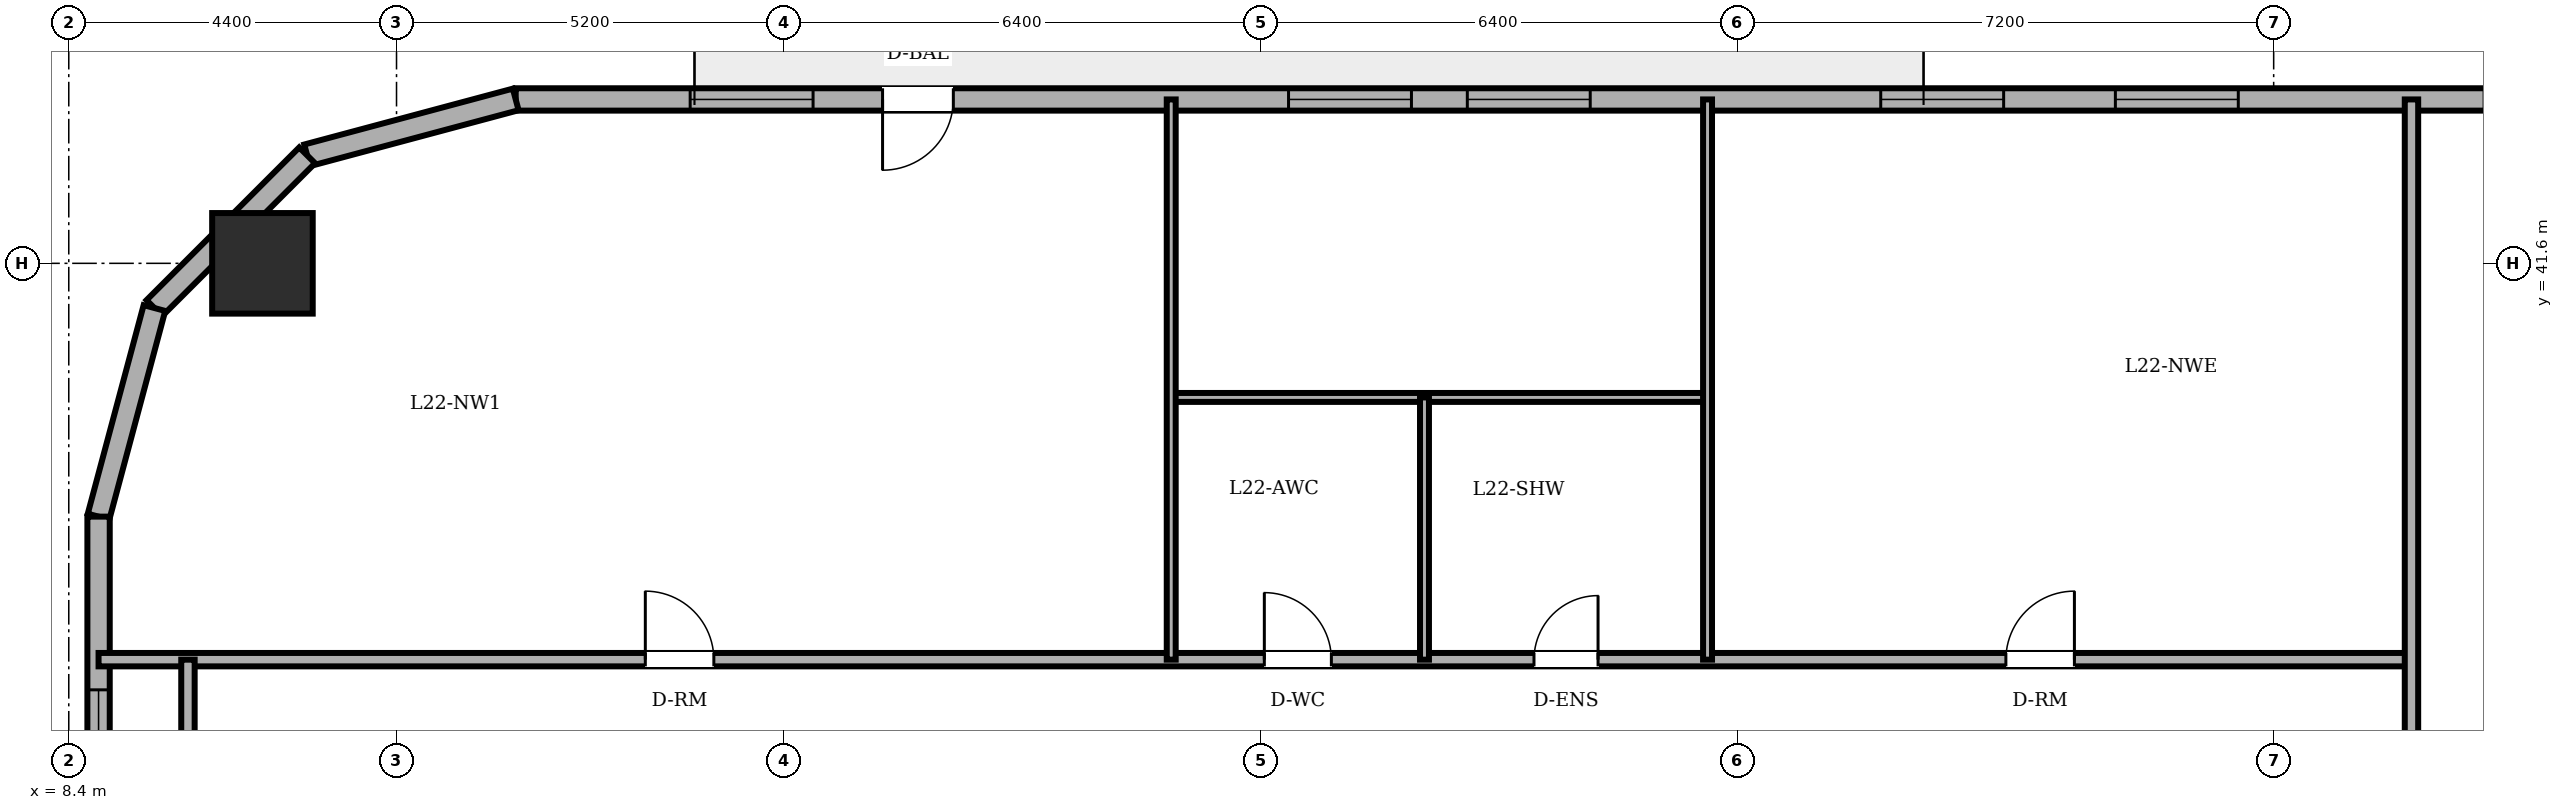
"""IFC4 building model, lengths in metres.
Left out: names, types, materials, properties, quantities, classifications, styles, units other than length and angle.
Written with IfcOpenShell. Run it as: python <this file> out.ifc"""

import sys

from ifc_helpers import new_model, si_unit, direction, frame, frame_2d, origin, origin_2d, place, context, subcontext, project, spatial, rectangle, circle, extrude, element, fill, save


model = new_model("IFC4")
c1 = context("Model", 3, precision=1e-05, world=origin(), true_north=direction((0.0, 1.0)))
c2 = subcontext(c1, "Body", "Model", "MODEL_VIEW")
j1 = project(units=[si_unit("LENGTHUNIT", "METRE"), si_unit("PLANEANGLEUNIT", "RADIAN")], contexts=[c1])
p1 = place(None, origin())
s1 = spatial("IfcSite", under=j1, at=p1, CompositionType="ELEMENT")
p2 = place(p1, origin())
s2 = spatial("IfcBuilding", under=s1, at=p2, CompositionType="ELEMENT")
p3 = place(p2, frame((0.0, 0.0, 86.3)))
s3 = spatial("IfcBuildingStorey", under=s2, at=p3, CompositionType="ELEMENT", Elevation=86.3)
p4 = place(p3, frame((11.0, 41.6, 0.0), z_axis=(0.0, 0.0, 1.0), x_axis=(1.0, 0.0, 0.0)))
e1 = element("IfcColumn", 1, at=p4, inside=s3, PredefinedType="COLUMN", context=c2, shape_type="SweptSolid", body=[
    extrude(circle(Radius=0.675, at=origin_2d()), origin(), (0.0, 0.0, 1.0), 3.6),
])
p5 = place(p3, frame((44.333, 43.8, 0.0), z_axis=(0.0, 0.0, 1.0), x_axis=(-1.0, 0.0, 0.0)))
e2 = element("IfcWall", 2, at=p5, inside=s3, PredefinedType="SOLIDWALL", context=c2, shape_type="SweptSolid", body=[
    extrude(rectangle(XDim=29.933, YDim=0.3, at=frame_2d((14.967, 0.0))), origin(), (0.0, 0.0, 1.0), 3.4),
])
p6 = place(p5, frame((24.058, 0.0, 0.0)))
e3 = element("IfcOpeningElement", 3, at=p6, cuts=e2, PredefinedType="OPENING", context=c2, shape_type="SweptSolid", body=[
    extrude(rectangle(XDim=0.95, YDim=2.2, at=frame_2d((0.475, 1.1))), frame((0.0, 0.16, 0.0), z_axis=(0.0, -1.0, 0.0), x_axis=(1.0, 0.0, 0.0)), (0.0, 0.0, 1.0), 0.32),
])
p7 = place(p5, frame((1.858, 0.0, 0.85)))
e4 = element("IfcOpeningElement", 4, at=p7, cuts=e2, PredefinedType="OPENING", context=c2, shape_type="SweptSolid", body=[
    extrude(rectangle(XDim=1.65, YDim=1.55, at=frame_2d((0.825, 0.775))), frame((0.0, 0.16, 0.0), z_axis=(0.0, -1.0, 0.0), x_axis=(1.0, 0.0, 0.0)), (0.0, 0.0, 1.0), 0.32),
])
p8 = place(p5, frame((6.808, 0.0, 0.85)))
e5 = element("IfcOpeningElement", 5, at=p8, cuts=e2, PredefinedType="OPENING", context=c2, shape_type="SweptSolid", body=[
    extrude(rectangle(XDim=1.65, YDim=1.55, at=frame_2d((0.825, 0.775))), frame((0.0, 0.16, 0.0), z_axis=(0.0, -1.0, 0.0), x_axis=(1.0, 0.0, 0.0)), (0.0, 0.0, 1.0), 0.32),
])
p9 = place(p5, frame((9.958, 0.0, 0.85)))
e6 = element("IfcOpeningElement", 6, at=p9, cuts=e2, PredefinedType="OPENING", context=c2, shape_type="SweptSolid", body=[
    extrude(rectangle(XDim=1.65, YDim=1.55, at=frame_2d((0.825, 0.775))), frame((0.0, 0.16, 0.0), z_axis=(0.0, -1.0, 0.0), x_axis=(1.0, 0.0, 0.0)), (0.0, 0.0, 1.0), 0.32),
])
p10 = place(p5, frame((15.508, 0.0, 0.85)))
e7 = element("IfcOpeningElement", 7, at=p10, cuts=e2, PredefinedType="OPENING", context=c2, shape_type="SweptSolid", body=[
    extrude(rectangle(XDim=1.65, YDim=1.55, at=frame_2d((0.825, 0.775))), frame((0.0, 0.16, 0.0), z_axis=(0.0, -1.0, 0.0), x_axis=(1.0, 0.0, 0.0)), (0.0, 0.0, 1.0), 0.32),
])
p11 = place(p5, frame((17.908, 0.0, 0.85)))
e8 = element("IfcOpeningElement", 8, at=p11, cuts=e2, PredefinedType="OPENING", context=c2, shape_type="SweptSolid", body=[
    extrude(rectangle(XDim=1.65, YDim=1.55, at=frame_2d((0.825, 0.775))), frame((0.0, 0.16, 0.0), z_axis=(0.0, -1.0, 0.0), x_axis=(1.0, 0.0, 0.0)), (0.0, 0.0, 1.0), 0.32),
])
p12 = place(p5, frame((25.941, 0.0, 0.85)))
e9 = element("IfcOpeningElement", 9, at=p12, cuts=e2, PredefinedType="OPENING", context=c2, shape_type="SweptSolid", body=[
    extrude(rectangle(XDim=1.65, YDim=1.55, at=frame_2d((0.825, 0.775))), frame((0.0, 0.16, 0.0), z_axis=(0.0, -1.0, 0.0), x_axis=(1.0, 0.0, 0.0)), (0.0, 0.0, 1.0), 0.32),
])
p13 = place(p3, frame((14.4, 43.8, 0.0), z_axis=(0.0, 0.0, 1.0), x_axis=(-0.965943540406, -0.258752926066, 0.0)))
e10 = element("IfcWall", 10, at=p13, inside=s3, PredefinedType="SOLIDWALL", context=c2, shape_type="SweptSolid", body=[
    extrude(rectangle(XDim=2.898, YDim=0.3, at=frame_2d((1.449, 0.0))), origin(), (0.0, 0.0, 1.0), 3.4),
])
p14 = place(p3, frame((11.6, 43.05, 0.0), z_axis=(0.0, 0.0, 1.0), x_axis=(-0.707106781187, -0.707106781187, 0.0)))
e11 = element("IfcWall", 11, at=p14, inside=s3, PredefinedType="SOLIDWALL", context=c2, shape_type="SweptSolid", body=[
    extrude(rectangle(XDim=2.899, YDim=0.3, at=frame_2d((1.45, 0.0))), origin(), (0.0, 0.0, 1.0), 3.4),
])
p15 = place(p3, frame((9.55, 41.0, 0.0), z_axis=(0.0, 0.0, 1.0), x_axis=(-0.258731875344, -0.96594917914, 0.0)))
e12 = element("IfcWall", 12, at=p15, inside=s3, PredefinedType="SOLIDWALL", context=c2, shape_type="SweptSolid", body=[
    extrude(rectangle(XDim=2.899, YDim=0.3, at=frame_2d((1.449, 0.0))), origin(), (0.0, 0.0, 1.0), 3.4),
])
p16 = place(p3, frame((8.8, 38.2, 0.0), z_axis=(0.0, 0.0, 1.0), x_axis=(0.0, -1.0, 0.0)))
e13 = element("IfcWall", 13, at=p16, inside=s3, PredefinedType="SOLIDWALL", context=c2, shape_type="SweptSolid", body=[
    extrude(rectangle(XDim=28.4, YDim=0.3, at=frame_2d((14.2, 0.0))), origin(), (0.0, 0.0, 1.0), 3.4),
])
p17 = place(p16, frame((2.325, 0.0, 0.85)))
e14 = element("IfcOpeningElement", 14, at=p17, cuts=e13, PredefinedType="OPENING", context=c2, shape_type="SweptSolid", body=[
    extrude(rectangle(XDim=1.65, YDim=1.55, at=frame_2d((0.825, 0.775))), frame((0.0, 0.16, 0.0), z_axis=(0.0, -1.0, 0.0), x_axis=(1.0, 0.0, 0.0)), (0.0, 0.0, 1.0), 0.32),
])
p18 = place(p16, frame((7.328, 0.0, 0.85)))
e15 = element("IfcOpeningElement", 15, at=p18, cuts=e13, PredefinedType="OPENING", context=c2, shape_type="SweptSolid", body=[
    extrude(rectangle(XDim=1.65, YDim=1.55, at=frame_2d((0.825, 0.775))), frame((0.0, 0.16, 0.0), z_axis=(0.0, -1.0, 0.0), x_axis=(1.0, 0.0, 0.0)), (0.0, 0.0, 1.0), 0.32),
])
p19 = place(p16, frame((11.102, 0.0, 0.85)))
e16 = element("IfcOpeningElement", 16, at=p19, cuts=e13, PredefinedType="OPENING", context=c2, shape_type="SweptSolid", body=[
    extrude(rectangle(XDim=1.65, YDim=1.55, at=frame_2d((0.825, 0.775))), frame((0.0, 0.16, 0.0), z_axis=(0.0, -1.0, 0.0), x_axis=(1.0, 0.0, 0.0)), (0.0, 0.0, 1.0), 0.32),
])
p20 = place(p16, frame((17.648, 0.0, 0.85)))
e17 = element("IfcOpeningElement", 17, at=p20, cuts=e13, PredefinedType="OPENING", context=c2, shape_type="SweptSolid", body=[
    extrude(rectangle(XDim=1.65, YDim=1.55, at=frame_2d((0.825, 0.775))), frame((0.0, 0.16, 0.0), z_axis=(0.0, -1.0, 0.0), x_axis=(1.0, 0.0, 0.0)), (0.0, 0.0, 1.0), 0.32),
])
p21 = place(p16, frame((20.422, 0.0, 0.85)))
e18 = element("IfcOpeningElement", 18, at=p21, cuts=e13, PredefinedType="OPENING", context=c2, shape_type="SweptSolid", body=[
    extrude(rectangle(XDim=1.65, YDim=1.55, at=frame_2d((0.825, 0.775))), frame((0.0, 0.16, 0.0), z_axis=(0.0, -1.0, 0.0), x_axis=(1.0, 0.0, 0.0)), (0.0, 0.0, 1.0), 0.32),
])
p22 = place(p16, frame((24.425, 0.0, 0.85)))
e19 = element("IfcOpeningElement", 19, at=p22, cuts=e13, PredefinedType="OPENING", context=c2, shape_type="SweptSolid", body=[
    extrude(rectangle(XDim=1.65, YDim=1.55, at=frame_2d((0.825, 0.775))), frame((0.0, 0.16, 0.0), z_axis=(0.0, -1.0, 0.0), x_axis=(1.0, 0.0, 0.0)), (0.0, 0.0, 1.0), 0.32),
])
p23 = place(p3, frame((8.8, 36.28, 0.0), z_axis=(0.0, 0.0, 1.0), x_axis=(1.0, 0.0, 0.0)))
e20 = element("IfcWall", 20, at=p23, inside=s3, PredefinedType="PARTITIONING", context=c2, shape_type="SweptSolid", body=[
    extrude(rectangle(XDim=31.05, YDim=0.18, at=frame_2d((15.525, 0.0))), origin(), (0.0, 0.0, 1.0), 3.4),
])
p24 = place(p23, frame((15.65, 0.0, 0.0)))
e21 = element("IfcOpeningElement", 21, at=p24, cuts=e20, PredefinedType="OPENING", context=c2, shape_type="SweptSolid", body=[
    extrude(rectangle(XDim=0.9, YDim=2.1, at=frame_2d((0.45, 1.05))), frame((0.0, 0.1, 0.0), z_axis=(0.0, -1.0, 0.0), x_axis=(1.0, 0.0, 0.0)), (0.0, 0.0, 1.0), 0.2),
])
p25 = place(p23, frame((19.27, 0.0, 0.0)))
e22 = element("IfcOpeningElement", 22, at=p25, cuts=e20, PredefinedType="OPENING", context=c2, shape_type="SweptSolid", body=[
    extrude(rectangle(XDim=0.86, YDim=2.1, at=frame_2d((0.43, 1.05))), frame((0.0, 0.1, 0.0), z_axis=(0.0, -1.0, 0.0), x_axis=(1.0, 0.0, 0.0)), (0.0, 0.0, 1.0), 0.2),
])
p26 = place(p23, frame((7.34, 0.0, 0.0)))
e23 = element("IfcOpeningElement", 23, at=p26, cuts=e20, PredefinedType="OPENING", context=c2, shape_type="SweptSolid", body=[
    extrude(rectangle(XDim=0.92, YDim=2.1, at=frame_2d((0.46, 1.05))), frame((0.0, 0.1, 0.0), z_axis=(0.0, -1.0, 0.0), x_axis=(1.0, 0.0, 0.0)), (0.0, 0.0, 1.0), 0.2),
])
p27 = place(p23, frame((25.605, 0.0, 0.0)))
e24 = element("IfcOpeningElement", 24, at=p27, cuts=e20, PredefinedType="OPENING", context=c2, shape_type="SweptSolid", body=[
    extrude(rectangle(XDim=0.92, YDim=2.1, at=frame_2d((0.46, 1.05))), frame((0.0, 0.1, 0.0), z_axis=(0.0, -1.0, 0.0), x_axis=(1.0, 0.0, 0.0)), (0.0, 0.0, 1.0), 0.2),
])
p28 = place(p3, frame((23.2, 39.8, 0.0), z_axis=(0.0, 0.0, 1.0), x_axis=(1.0, 0.0, 0.0)))
e25 = element("IfcWall", 25, at=p28, inside=s3, PredefinedType="PARTITIONING", context=c2, shape_type="SweptSolid", body=[
    extrude(rectangle(XDim=7.2, YDim=0.12, at=frame_2d((3.6, 0.0))), origin(), (0.0, 0.0, 1.0), 3.4),
])
p29 = place(p3, frame((10.0, 33.82, 0.0), z_axis=(0.0, 0.0, 1.0), x_axis=(0.0, 1.0, 0.0)))
e26 = element("IfcWall", 26, at=p29, inside=s3, PredefinedType="PARTITIONING", context=c2, shape_type="SweptSolid", body=[
    extrude(rectangle(XDim=2.46, YDim=0.18, at=frame_2d((1.23, 0.0))), origin(), (0.0, 0.0, 1.0), 3.4),
])
p30 = place(p3, frame((23.2, 36.28, 0.0), z_axis=(0.0, 0.0, 1.0), x_axis=(0.0, 1.0, 0.0)))
e27 = element("IfcWall", 27, at=p30, inside=s3, PredefinedType="PARTITIONING", context=c2, shape_type="SweptSolid", body=[
    extrude(rectangle(XDim=7.52, YDim=0.12, at=frame_2d((3.76, 0.0))), origin(), (0.0, 0.0, 1.0), 3.4),
])
p31 = place(p3, frame((26.6, 36.28, 0.0), z_axis=(0.0, 0.0, 1.0), x_axis=(0.0, 1.0, 0.0)))
e28 = element("IfcWall", 28, at=p31, inside=s3, PredefinedType="PARTITIONING", context=c2, shape_type="SweptSolid", body=[
    extrude(rectangle(XDim=3.52, YDim=0.12, at=frame_2d((1.76, 0.0))), origin(), (0.0, 0.0, 1.0), 3.4),
])
p32 = place(p3, frame((30.4, 36.28, 0.0), z_axis=(0.0, 0.0, 1.0), x_axis=(0.0, 1.0, 0.0)))
e29 = element("IfcWall", 29, at=p32, inside=s3, PredefinedType="PARTITIONING", context=c2, shape_type="SweptSolid", body=[
    extrude(rectangle(XDim=7.52, YDim=0.12, at=frame_2d((3.76, 0.0))), origin(), (0.0, 0.0, 1.0), 3.4),
])
p33 = place(p3, frame((39.85, 25.18, 0.0), z_axis=(0.0, 0.0, 1.0), x_axis=(0.0, 1.0, 0.0)))
e30 = element("IfcWall", 30, at=p33, inside=s3, PredefinedType="PARTITIONING", context=c2, shape_type="SweptSolid", body=[
    extrude(rectangle(XDim=18.62, YDim=0.18, at=frame_2d((9.31, 0.0))), origin(), (0.0, 0.0, 1.0), 3.4),
])
p34 = place(p33, frame((5.35, 0.0, 0.0)))
e31 = element("IfcOpeningElement", 31, at=p34, cuts=e30, PredefinedType="OPENING", context=c2, shape_type="SweptSolid", body=[
    extrude(rectangle(XDim=0.92, YDim=2.1, at=frame_2d((0.46, 1.05))), frame((0.0, 0.1, 0.0), z_axis=(0.0, -1.0, 0.0), x_axis=(1.0, 0.0, 0.0)), (0.0, 0.0, 1.0), 0.2),
])
p35 = place(p6, origin())
e32 = element("IfcDoor", 32, at=p35, inside=s3, OperationType="SINGLE_SWING_RIGHT", PredefinedType="DOOR", context=c2, shape_type="SweptSolid", body=[
    extrude(rectangle(XDim=0.95, YDim=2.2, at=frame_2d((0.475, 1.1))), frame((0.0, 0.025, 0.0), z_axis=(0.0, -1.0, 0.0), x_axis=(1.0, 0.0, 0.0)), (0.0, 0.0, 1.0), 0.05),
])
fill(e3, e32)
p36 = place(p8, origin())
e33 = element("IfcWindow", 33, at=p36, inside=s3, PartitioningType="DOUBLE_PANEL_VERTICAL", PredefinedType="WINDOW", context=c2, shape_type="SweptSolid", body=[
    extrude(rectangle(XDim=1.65, YDim=1.55, at=frame_2d((0.825, 0.775))), frame((0.0, 0.03, 0.0), z_axis=(0.0, -1.0, 0.0), x_axis=(1.0, 0.0, 0.0)), (0.0, 0.0, 1.0), 0.06),
])
fill(e5, e33)
p37 = place(p9, origin())
e34 = element("IfcWindow", 34, at=p37, inside=s3, PartitioningType="DOUBLE_PANEL_VERTICAL", PredefinedType="WINDOW", context=c2, shape_type="SweptSolid", body=[
    extrude(rectangle(XDim=1.65, YDim=1.55, at=frame_2d((0.825, 0.775))), frame((0.0, 0.03, 0.0), z_axis=(0.0, -1.0, 0.0), x_axis=(1.0, 0.0, 0.0)), (0.0, 0.0, 1.0), 0.06),
])
fill(e6, e34)
p38 = place(p10, origin())
e35 = element("IfcWindow", 35, at=p38, inside=s3, PartitioningType="DOUBLE_PANEL_VERTICAL", PredefinedType="WINDOW", context=c2, shape_type="SweptSolid", body=[
    extrude(rectangle(XDim=1.65, YDim=1.55, at=frame_2d((0.825, 0.775))), frame((0.0, 0.03, 0.0), z_axis=(0.0, -1.0, 0.0), x_axis=(1.0, 0.0, 0.0)), (0.0, 0.0, 1.0), 0.06),
])
fill(e7, e35)
p39 = place(p11, origin())
e36 = element("IfcWindow", 36, at=p39, inside=s3, PartitioningType="DOUBLE_PANEL_VERTICAL", PredefinedType="WINDOW", context=c2, shape_type="SweptSolid", body=[
    extrude(rectangle(XDim=1.65, YDim=1.55, at=frame_2d((0.825, 0.775))), frame((0.0, 0.03, 0.0), z_axis=(0.0, -1.0, 0.0), x_axis=(1.0, 0.0, 0.0)), (0.0, 0.0, 1.0), 0.06),
])
fill(e8, e36)
p40 = place(p12, origin())
e37 = element("IfcWindow", 37, at=p40, inside=s3, PartitioningType="DOUBLE_PANEL_VERTICAL", PredefinedType="WINDOW", context=c2, shape_type="SweptSolid", body=[
    extrude(rectangle(XDim=1.65, YDim=1.55, at=frame_2d((0.825, 0.775))), frame((0.0, 0.03, 0.0), z_axis=(0.0, -1.0, 0.0), x_axis=(1.0, 0.0, 0.0)), (0.0, 0.0, 1.0), 0.06),
])
fill(e9, e37)
p41 = place(p17, origin())
e38 = element("IfcWindow", 38, at=p41, inside=s3, PartitioningType="DOUBLE_PANEL_VERTICAL", PredefinedType="WINDOW", context=c2, shape_type="SweptSolid", body=[
    extrude(rectangle(XDim=1.65, YDim=1.55, at=frame_2d((0.825, 0.775))), frame((0.0, 0.03, 0.0), z_axis=(0.0, -1.0, 0.0), x_axis=(1.0, 0.0, 0.0)), (0.0, 0.0, 1.0), 0.06),
])
fill(e14, e38)
p42 = place(p24, origin())
e39 = element("IfcDoor", 39, at=p42, inside=s3, OperationType="SINGLE_SWING_LEFT", PredefinedType="DOOR", context=c2, shape_type="SweptSolid", body=[
    extrude(rectangle(XDim=0.9, YDim=2.1, at=frame_2d((0.45, 1.05))), frame((0.0, 0.025, 0.0), z_axis=(0.0, -1.0, 0.0), x_axis=(1.0, 0.0, 0.0)), (0.0, 0.0, 1.0), 0.05),
])
fill(e21, e39)
p43 = place(p25, origin())
e40 = element("IfcDoor", 40, at=p43, inside=s3, OperationType="SINGLE_SWING_RIGHT", PredefinedType="DOOR", context=c2, shape_type="SweptSolid", body=[
    extrude(rectangle(XDim=0.86, YDim=2.1, at=frame_2d((0.43, 1.05))), frame((0.0, 0.025, 0.0), z_axis=(0.0, -1.0, 0.0), x_axis=(1.0, 0.0, 0.0)), (0.0, 0.0, 1.0), 0.05),
])
fill(e22, e40)
p44 = place(p26, origin())
e41 = element("IfcDoor", 41, at=p44, inside=s3, OperationType="SINGLE_SWING_LEFT", PredefinedType="DOOR", context=c2, shape_type="SweptSolid", body=[
    extrude(rectangle(XDim=0.92, YDim=2.1, at=frame_2d((0.46, 1.05))), frame((0.0, 0.025, 0.0), z_axis=(0.0, -1.0, 0.0), x_axis=(1.0, 0.0, 0.0)), (0.0, 0.0, 1.0), 0.05),
])
fill(e23, e41)
p45 = place(p27, origin())
e42 = element("IfcDoor", 42, at=p45, inside=s3, OperationType="SINGLE_SWING_RIGHT", PredefinedType="DOOR", context=c2, shape_type="SweptSolid", body=[
    extrude(rectangle(XDim=0.92, YDim=2.1, at=frame_2d((0.46, 1.05))), frame((0.0, 0.025, 0.0), z_axis=(0.0, -1.0, 0.0), x_axis=(1.0, 0.0, 0.0)), (0.0, 0.0, 1.0), 0.05),
])
fill(e24, e42)
save(model, sys.argv[1])
